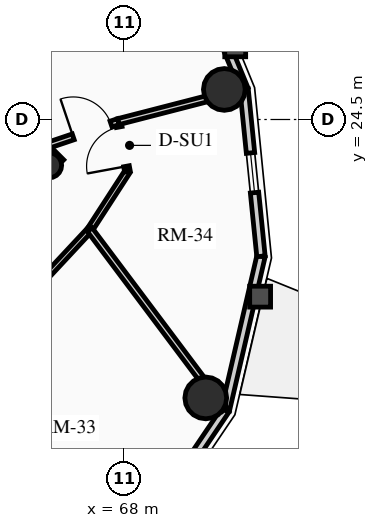
"""IFC4 building model, lengths in metres.
Left out: names, types, materials, properties, quantities, classifications, styles, units other than length and angle.
Written with IfcOpenShell. Run it as: python <this file> out.ifc"""

import sys

from ifc_helpers import new_model, si_unit, direction, frame, frame_2d, origin, origin_2d, place, context, subcontext, project, spatial, rectangle, circle, hollow_circle, extrude, source, transform, mapped, element, fill, save


model = new_model("IFC4")
c1 = context("Model", 3, precision=1e-05, world=origin(), true_north=direction((0.0, 1.0)))
c2 = subcontext(c1, "Body", "Model", "MODEL_VIEW")
j1 = project(units=[si_unit("LENGTHUNIT", "METRE"), si_unit("PLANEANGLEUNIT", "RADIAN")], contexts=[c1])
p1 = place(None, origin())
s1 = spatial("IfcSite", under=j1, at=p1, CompositionType="ELEMENT")
p2 = place(p1, origin())
s2 = spatial("IfcBuilding", under=s1, at=p2, CompositionType="ELEMENT")
p3 = place(p2, frame((0.0, 0.0, 217.03)))
s3 = spatial("IfcBuildingStorey", under=s2, at=p3, CompositionType="ELEMENT", Elevation=217.03)
p4 = place(p3, frame((66.268, 23.298, 0.0), z_axis=(0.0, 0.0, 1.0), x_axis=(-0.707106781187, 0.707106781187, 0.0)))
e1 = element("IfcWall", 1, at=p4, inside=s3, PredefinedType="SHEAR", context=c2, shape_type="SweptSolid", body=[
    extrude(rectangle(XDim=14.1, YDim=0.4, at=frame_2d((7.05, 0.0))), origin(), (0.0, 0.0, 1.0), 2.91),
])
p5 = place(p3, frame((58.561, 15.873, 0.0), z_axis=(0.0, 0.0, 1.0), x_axis=(0.707106781187, 0.707106781187, 0.0)))
e2 = element("IfcWall", 2, at=p5, inside=s3, PredefinedType="SHEAR", context=c2, shape_type="SweptSolid", body=[
    extrude(rectangle(XDim=10.7, YDim=0.4, at=frame_2d((5.35, 0.0))), origin(), (0.0, 0.0, 1.0), 2.91),
])
m1 = source(origin(), c2, "Body", "SweptSolid", [
    extrude(rectangle(XDim=1.5, YDim=2.02, at=frame_2d((0.75, 1.01))), frame((0.0, 0.21, 0.0), z_axis=(0.0, -1.0, 0.0), x_axis=(1.0, 0.0, 0.0)), (0.0, 0.0, 1.0), 0.42),
])
p6 = place(p5, frame((5.45, 0.0, 0.0)))
e3 = element("IfcOpeningElement", 3, at=p6, cuts=e2, PredefinedType="OPENING", context=c2, shape_type="MappedRepresentation", body=[
    mapped(m1, transform((0.0, 0.0, 0.0), x_axis=(1.0, 0.0, 0.0), y_axis=(0.0, 1.0, 0.0), z_axis=(0.0, 0.0, 1.0), scale=1.0)),
])
p7 = place(p3, frame((66.024, 23.294, 0.0), z_axis=(0.0, 0.0, 1.0), x_axis=(0.707106781187, 0.707106781187, 0.0)))
e4 = element("IfcColumn", 4, at=p7, inside=s3, PredefinedType="COLUMN", context=c2, shape_type="SweptSolid", body=[
    extrude(hollow_circle(Radius=0.33, WallThickness=0.025, at=origin_2d()), origin(), (0.0, 0.0, 1.0), 2.91),
])
for number, where, z_axis, x_axis in (
    (5, (70.146, 17.173, 0.0), (0.0, 0.0, 1.0), (1.0, 0.0, 0.0)),
    (6, (70.635, 25.291, 0.0), (0.0, 0.0, 1.0), (1.0, 0.0, 0.0)),
):
    element("IfcColumn", number, at=place(p3, frame(where, z_axis=z_axis, x_axis=x_axis)), inside=s3, PredefinedType="USERDEFINED", context=c2, shape_type="SweptSolid", body=[
        extrude(circle(Radius=0.55, at=origin_2d()), origin(), (0.0, 0.0, 1.0), 2.91),
    ])
p8 = place(p3, frame((70.663, 16.856, 0.0), z_axis=(0.0, 0.0, 1.0), x_axis=(-0.559495003079, -0.828833723692, 0.0)))
e7 = element("IfcWall", 7, at=p8, inside=s3, PredefinedType="SOLIDWALL", context=c2, shape_type="SweptSolid", body=[
    extrude(rectangle(XDim=3.976, YDim=0.22, at=frame_2d((1.988, 0.0))), origin(), (0.0, 0.0, 1.0), 2.322),
])
m2 = source(origin(), c2, "Body", "SweptSolid", [
    extrude(rectangle(XDim=1.05, YDim=1.3, at=frame_2d((0.525, 0.65))), frame((0.0, 0.12, 0.0), z_axis=(0.0, -1.0, 0.0), x_axis=(1.0, 0.0, 0.0)), (0.0, 0.0, 1.0), 0.24),
])
p9 = place(p8, frame((1.463, 0.0, 0.65)))
e8 = element("IfcOpeningElement", 8, at=p9, cuts=e7, PredefinedType="OPENING", context=c2, shape_type="MappedRepresentation", body=[
    mapped(m2, transform((0.0, 0.0, 0.0), x_axis=(1.0, 0.0, 0.0), y_axis=(0.0, 1.0, 0.0), z_axis=(0.0, 0.0, 1.0), scale=1.0)),
])
p10 = place(p3, frame((71.599, 20.9, 0.0), z_axis=(0.0, 0.0, 1.0), x_axis=(-0.225473813158, -0.974249228678, 0.0)))
e9 = element("IfcWall", 9, at=p10, inside=s3, PredefinedType="SOLIDWALL", context=c2, shape_type="SweptSolid", body=[
    extrude(rectangle(XDim=4.15, YDim=0.22, at=frame_2d((2.075, 0.0))), origin(), (0.0, 0.0, 1.0), 2.322),
])
p11 = place(p3, frame((71.155, 25.295, 0.0), z_axis=(0.0, 0.0, 1.0), x_axis=(0.100570534541, -0.994929930991, 0.0)))
e10 = element("IfcWall", 10, at=p11, inside=s3, PredefinedType="SOLIDWALL", context=c2, shape_type="SweptSolid", body=[
    extrude(rectangle(XDim=4.418, YDim=0.22, at=frame_2d((2.209, 0.0))), origin(), (0.0, 0.0, 1.0), 2.322),
])
p12 = place(p11, frame((1.684, 0.0, 0.65)))
e11 = element("IfcOpeningElement", 11, at=p12, cuts=e10, PredefinedType="OPENING", context=c2, shape_type="MappedRepresentation", body=[
    mapped(m2, transform((0.0, 0.0, 0.0), x_axis=(1.0, 0.0, 0.0), y_axis=(0.0, 1.0, 0.0), z_axis=(0.0, 0.0, 1.0), scale=1.0)),
])
p13 = place(p3, frame((69.374, 29.613, 0.0), z_axis=(0.0, 0.0, 1.0), x_axis=(0.381309704956, -0.924447353237, 0.0)))
e12 = element("IfcWall", 12, at=p13, inside=s3, PredefinedType="SOLIDWALL", context=c2, shape_type="SweptSolid", body=[
    extrude(rectangle(XDim=4.671, YDim=0.22, at=frame_2d((2.335, 0.0))), origin(), (0.0, 0.0, 1.0), 2.322),
])
p14 = place(p3, frame((62.736, 16.924, 0.0), z_axis=(0.0, 0.0, 1.0), x_axis=(0.681946700833, 0.731401871219, 0.0)))
e13 = element("IfcWall", 13, at=p14, inside=s3, PredefinedType="PARTITIONING", context=c2, shape_type="SweptSolid", body=[
    extrude(rectangle(XDim=6.393, YDim=0.15, at=frame_2d((3.196, 0.0))), origin(), (0.0, 0.0, 1.0), 2.255),
])
p15 = place(p3, frame((67.095, 21.6, 0.0), z_axis=(0.0, 0.0, 1.0), x_axis=(0.543773190184, 0.839232219137, 0.0)))
e14 = element("IfcWall", 14, at=p15, inside=s3, PredefinedType="PARTITIONING", context=c2, shape_type="SweptSolid", body=[
    extrude(rectangle(XDim=1.823, YDim=0.15, at=frame_2d((0.911, 0.0))), origin(), (0.0, 0.0, 1.0), 2.255),
])
p16 = place(p3, frame((68.086, 23.129, 0.0), z_axis=(0.0, 0.0, 1.0), x_axis=(-0.182004193146, 0.983297754334, 0.0)))
e15 = element("IfcWall", 15, at=p16, inside=s3, PredefinedType="PARTITIONING", context=c2, shape_type="SweptSolid", body=[
    extrude(rectangle(XDim=1.336, YDim=0.15, at=frame_2d((0.668, 0.0))), origin(), (0.0, 0.0, 1.0), 2.322),
])
m3 = source(origin(), c2, "Body", "SweptSolid", [
    extrude(rectangle(XDim=1.05, YDim=2.015, at=frame_2d((0.525, 1.007))), frame((0.0, 0.085, 0.0), z_axis=(0.0, -1.0, 0.0), x_axis=(1.0, 0.0, 0.0)), (0.0, 0.0, 1.0), 0.17),
])
p17 = place(p16, frame((0.143, 0.0, 0.0)))
e16 = element("IfcOpeningElement", 16, at=p17, cuts=e15, PredefinedType="OPENING", context=c2, shape_type="MappedRepresentation", body=[
    mapped(m3, transform((0.0, 0.0, 0.0), x_axis=(1.0, 0.0, 0.0), y_axis=(0.0, 1.0, 0.0), z_axis=(0.0, 0.0, 1.0), scale=1.0)),
])
p18 = place(p3, frame((67.095, 21.6, 0.0), z_axis=(0.0, 0.0, 1.0), x_axis=(0.599947190798, -0.800039604178, 0.0)))
e17 = element("IfcWall", 17, at=p18, inside=s3, PredefinedType="PARTITIONING", context=c2, shape_type="SweptSolid", body=[
    extrude(rectangle(XDim=5.918, YDim=0.16, at=frame_2d((2.959, 0.0))), origin(), (0.0, 0.0, 1.0), 2.322),
])
p19 = place(p3, frame((67.843, 24.443, 0.0), z_axis=(0.0, 0.0, 1.0), x_axis=(0.968303102463, 0.249778105048, 0.0)))
e18 = element("IfcWall", 18, at=p19, inside=s3, PredefinedType="PARTITIONING", context=c2, shape_type="SweptSolid", body=[
    extrude(rectangle(XDim=3.399, YDim=0.16, at=frame_2d((1.7, 0.0))), origin(), (0.0, 0.0, 1.0), 2.322),
])
p20 = place(p3, frame((66.021, 23.828, 0.0), z_axis=(0.0, 0.0, 1.0), x_axis=(0.947522075691, 0.319690344049, 0.0)))
e19 = element("IfcWall", 19, at=p20, inside=s3, PredefinedType="PARTITIONING", context=c2, shape_type="SweptSolid", body=[
    extrude(rectangle(XDim=1.924, YDim=0.16, at=frame_2d((0.962, 0.0))), origin(), (0.0, 0.0, 1.0), 2.255),
])
m4 = source(origin(), c2, "Body", "SweptSolid", [
    extrude(rectangle(XDim=1.05, YDim=2.015, at=frame_2d((0.525, 1.007))), frame((0.0, 0.09, 0.0), z_axis=(0.0, -1.0, 0.0), x_axis=(1.0, 0.0, 0.0)), (0.0, 0.0, 1.0), 0.18),
])
p21 = place(p20, frame((0.674, 0.0, 0.0)))
e20 = element("IfcOpeningElement", 20, at=p21, cuts=e19, PredefinedType="OPENING", context=c2, shape_type="MappedRepresentation", body=[
    mapped(m4, transform((0.0, 0.0, 0.0), x_axis=(1.0, 0.0, 0.0), y_axis=(0.0, 1.0, 0.0), z_axis=(0.0, 0.0, 1.0), scale=1.0)),
])
m5 = source(origin(), c2, "Body", "SweptSolid", [
    extrude(rectangle(XDim=1.05, YDim=1.3, at=frame_2d((0.525, 0.65))), frame((0.0, 0.03, 0.0), z_axis=(0.0, -1.0, 0.0), x_axis=(1.0, 0.0, 0.0)), (0.0, 0.0, 1.0), 0.06),
])
p22 = place(p12, origin())
e21 = element("IfcWindow", 21, at=p22, inside=s3, PartitioningType="SINGLE_PANEL", PredefinedType="WINDOW", context=c2, shape_type="MappedRepresentation", body=[
    mapped(m5, transform((0.0, 0.0, 0.0), x_axis=(1.0, 0.0, 0.0), y_axis=(0.0, 1.0, 0.0), z_axis=(0.0, 0.0, 1.0), scale=1.0)),
])
fill(e11, e21)
m6 = source(origin(), c2, "Body", "SweptSolid", [
    extrude(rectangle(XDim=1.05, YDim=2.015, at=frame_2d((0.525, 1.007))), frame((0.0, 0.025, 0.0), z_axis=(0.0, -1.0, 0.0), x_axis=(1.0, 0.0, 0.0)), (0.0, 0.0, 1.0), 0.05),
])
p23 = place(p21, origin())
e22 = element("IfcDoor", 22, at=p23, inside=s3, OperationType="SINGLE_SWING_LEFT", PredefinedType="DOOR", context=c2, shape_type="MappedRepresentation", body=[
    mapped(m6, transform((0.0, 0.0, 0.0), x_axis=(1.0, 0.0, 0.0), y_axis=(0.0, 1.0, 0.0), z_axis=(0.0, 0.0, 1.0), scale=1.0)),
])
fill(e20, e22)
p24 = place(p17, origin())
e23 = element("IfcDoor", 23, at=p24, inside=s3, OperationType="SINGLE_SWING_LEFT", PredefinedType="DOOR", context=c2, shape_type="MappedRepresentation", body=[
    mapped(m6, transform((0.0, 0.0, 0.0), x_axis=(1.0, 0.0, 0.0), y_axis=(0.0, 1.0, 0.0), z_axis=(0.0, 0.0, 1.0), scale=1.0)),
])
fill(e16, e23)
save(model, sys.argv[1])
